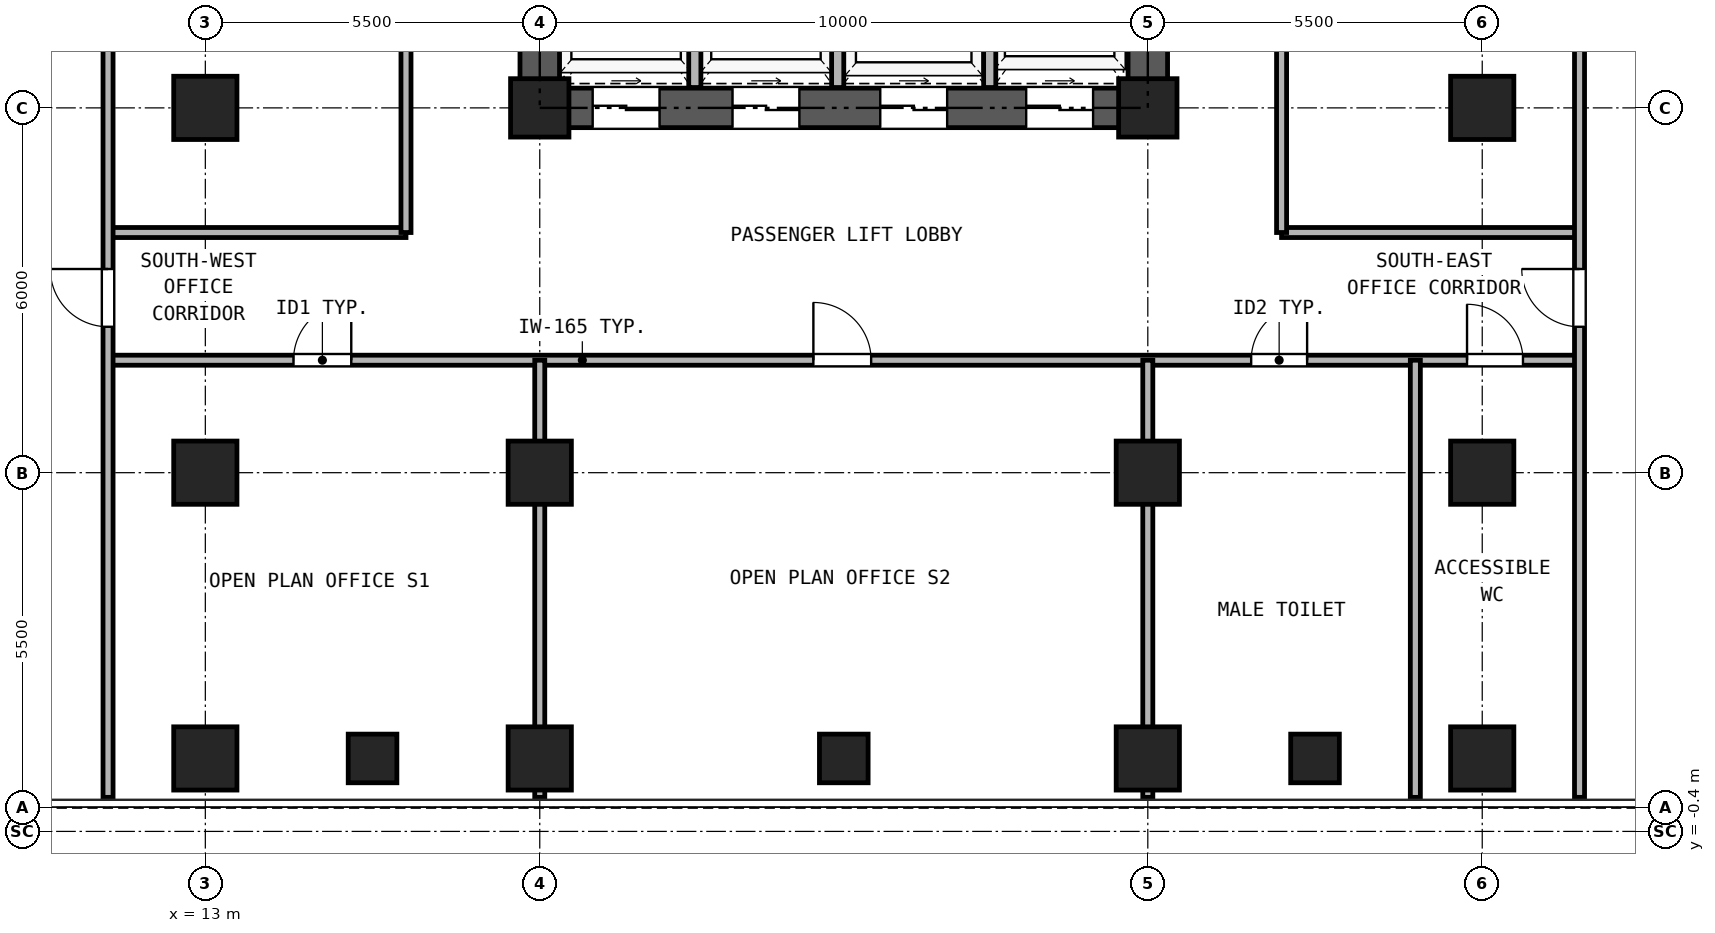
"""IFC4 building model, lengths in metres.
Left out: names, types, materials, properties, quantities, classifications, styles, units other than length and angle.
Written with IfcOpenShell. Run it as: python <this file> out.ifc"""

import sys

from ifc_helpers import new_model, si_unit, direction, frame, frame_2d, origin, origin_2d, place, context, subcontext, project, spatial, rectangle, hollow_rectangle, extrude, source, transform, mapped, element, fill, save


model = new_model("IFC4")
c1 = context("Model", 3, precision=1e-05, world=origin(), true_north=direction((0.0, 1.0)))
c2 = subcontext(c1, "Body", "Model", "MODEL_VIEW")
j1 = project(units=[si_unit("LENGTHUNIT", "METRE"), si_unit("PLANEANGLEUNIT", "RADIAN")], contexts=[c1])
p1 = place(None, origin())
s1 = spatial("IfcSite", under=j1, at=p1, CompositionType="ELEMENT")
p2 = place(p1, origin())
s2 = spatial("IfcBuilding", under=s1, at=p2, CompositionType="ELEMENT")
p3 = place(p2, frame((0.0, 0.0, 33.3)))
s3 = spatial("IfcBuildingStorey", under=s2, at=p3, CompositionType="ELEMENT", Elevation=33.3)
m1 = source(origin(), c2, "Body", "SweptSolid", [
    extrude(hollow_rectangle(XDim=1.04, YDim=1.04, WallThickness=0.065, at=origin_2d()), origin(), (0.0, 0.0, 1.0), 3.32),
])
for number, where, z_axis, x_axis in (
    (1, (13.0, 0.8, 0.0), (0.0, 0.0, 1.0), (1.0, 0.0, 0.0)),
    (2, (18.5, 0.8, 0.0), (0.0, 0.0, 1.0), (1.0, 0.0, 0.0)),
    (3, (28.5, 0.8, 0.0), (0.0, 0.0, 1.0), (1.0, 0.0, 0.0)),
    (4, (34.0, 0.8, 0.0), (0.0, 0.0, 1.0), (1.0, 0.0, 0.0)),
    (5, (13.0, 5.5, 0.0), (0.0, 0.0, 1.0), (1.0, 0.0, 0.0)),
    (6, (13.0, 11.5, 0.0), (0.0, 0.0, 1.0), (1.0, 0.0, 0.0)),
    (7, (18.5, 5.5, 0.0), (0.0, 0.0, 1.0), (1.0, 0.0, 0.0)),
):
    element("IfcColumn", number, at=place(p3, frame(where, z_axis=z_axis, x_axis=x_axis)), inside=s3, PredefinedType="COLUMN", context=c2, shape_type="MappedRepresentation", body=[
        mapped(m1, transform((0.0, 0.0, 0.0), x_axis=(1.0, 0.0, 0.0), y_axis=(0.0, 1.0, 0.0), z_axis=(0.0, 0.0, 1.0), scale=1.0)),
    ])
m2 = source(origin(), c2, "Body", "SweptSolid", [
    extrude(hollow_rectangle(XDim=0.96, YDim=0.96, WallThickness=0.06, at=origin_2d()), origin(), (0.0, 0.0, 1.0), 3.32),
])
p4 = place(p3, frame((18.5, 11.5, 0.0), z_axis=(0.0, 0.0, 1.0), x_axis=(1.0, 0.0, 0.0)))
e8 = element("IfcColumn", 8, at=p4, inside=s3, PredefinedType="COLUMN", context=c2, shape_type="MappedRepresentation", body=[
    mapped(m2, transform((0.0, 0.0, 0.0), x_axis=(1.0, 0.0, 0.0), y_axis=(0.0, 1.0, 0.0), z_axis=(0.0, 0.0, 1.0), scale=1.0)),
])
p5 = place(p3, frame((28.5, 5.5, 0.0), z_axis=(0.0, 0.0, 1.0), x_axis=(1.0, 0.0, 0.0)))
e9 = element("IfcColumn", 9, at=p5, inside=s3, PredefinedType="COLUMN", context=c2, shape_type="MappedRepresentation", body=[
    mapped(m1, transform((0.0, 0.0, 0.0), x_axis=(1.0, 0.0, 0.0), y_axis=(0.0, 1.0, 0.0), z_axis=(0.0, 0.0, 1.0), scale=1.0)),
])
p6 = place(p3, frame((28.5, 11.5, 0.0), z_axis=(0.0, 0.0, 1.0), x_axis=(1.0, 0.0, 0.0)))
e10 = element("IfcColumn", 10, at=p6, inside=s3, PredefinedType="COLUMN", context=c2, shape_type="MappedRepresentation", body=[
    mapped(m2, transform((0.0, 0.0, 0.0), x_axis=(1.0, 0.0, 0.0), y_axis=(0.0, 1.0, 0.0), z_axis=(0.0, 0.0, 1.0), scale=1.0)),
])
for number, where, z_axis, x_axis in (
    (11, (34.0, 5.5, 0.0), (0.0, 0.0, 1.0), (1.0, 0.0, 0.0)),
    (12, (34.0, 11.5, 0.0), (0.0, 0.0, 1.0), (1.0, 0.0, 0.0)),
):
    element("IfcColumn", number, at=place(p3, frame(where, z_axis=z_axis, x_axis=x_axis)), inside=s3, PredefinedType="COLUMN", context=c2, shape_type="MappedRepresentation", body=[
        mapped(m1, transform((0.0, 0.0, 0.0), x_axis=(1.0, 0.0, 0.0), y_axis=(0.0, 1.0, 0.0), z_axis=(0.0, 0.0, 1.0), scale=1.0)),
    ])
m3 = source(origin(), c2, "Body", "SweptSolid", [
    extrude(hollow_rectangle(XDim=0.8, YDim=0.8, WallThickness=0.045, at=origin_2d()), origin(), (0.0, 0.0, 1.0), 3.32),
])
for number, where, z_axis, x_axis in (
    (13, (15.75, 0.8, 0.0), (0.0, 0.0, 1.0), (1.0, 0.0, 0.0)),
    (14, (23.5, 0.8, 0.0), (0.0, 0.0, 1.0), (1.0, 0.0, 0.0)),
    (15, (31.25, 0.8, 0.0), (0.0, 0.0, 1.0), (1.0, 0.0, 0.0)),
):
    element("IfcColumn", number, at=place(p3, frame(where, z_axis=z_axis, x_axis=x_axis)), inside=s3, PredefinedType="COLUMN", context=c2, shape_type="MappedRepresentation", body=[
        mapped(m3, transform((0.0, 0.0, 0.0), x_axis=(1.0, 0.0, 0.0), y_axis=(0.0, 1.0, 0.0), z_axis=(0.0, 0.0, 1.0), scale=1.0)),
    ])
p7 = place(p3, frame((18.175, 11.5, 0.0), z_axis=(0.0, 0.0, 1.0), x_axis=(1.0, 0.0, 0.0)))
e16 = element("IfcWall", 16, at=p7, inside=s3, PredefinedType="SHEAR", context=c2, shape_type="SweptSolid", body=[
    extrude(rectangle(XDim=10.65, YDim=0.65, at=frame_2d((5.325, 0.0))), origin(), (0.0, 0.0, 1.0), 3.32),
])
p8 = place(p7, frame((1.195, 0.0, 0.0)))
e17 = element("IfcOpeningElement", 17, at=p8, cuts=e16, PredefinedType="OPENING", context=c2, shape_type="SweptSolid", body=[
    extrude(rectangle(XDim=1.1, YDim=2.25, at=frame_2d((0.55, 1.125))), frame((0.0, 0.335, 0.0), z_axis=(0.0, -1.0, 0.0), x_axis=(1.0, 0.0, 0.0)), (0.0, 0.0, 1.0), 0.67),
])
p9 = place(p7, frame((3.495, 0.0, 0.0)))
e18 = element("IfcOpeningElement", 18, at=p9, cuts=e16, PredefinedType="OPENING", context=c2, shape_type="SweptSolid", body=[
    extrude(rectangle(XDim=1.1, YDim=2.25, at=frame_2d((0.55, 1.125))), frame((0.0, 0.335, 0.0), z_axis=(0.0, -1.0, 0.0), x_axis=(1.0, 0.0, 0.0)), (0.0, 0.0, 1.0), 0.67),
])
p10 = place(p7, frame((5.925, 0.0, 0.0)))
e19 = element("IfcOpeningElement", 19, at=p10, cuts=e16, PredefinedType="OPENING", context=c2, shape_type="SweptSolid", body=[
    extrude(rectangle(XDim=1.1, YDim=2.25, at=frame_2d((0.55, 1.125))), frame((0.0, 0.335, 0.0), z_axis=(0.0, -1.0, 0.0), x_axis=(1.0, 0.0, 0.0)), (0.0, 0.0, 1.0), 0.67),
])
p11 = place(p7, frame((8.325, 0.0, 0.0)))
e20 = element("IfcOpeningElement", 20, at=p11, cuts=e16, PredefinedType="OPENING", context=c2, shape_type="SweptSolid", body=[
    extrude(rectangle(XDim=1.1, YDim=2.25, at=frame_2d((0.55, 1.125))), frame((0.0, 0.335, 0.0), z_axis=(0.0, -1.0, 0.0), x_axis=(1.0, 0.0, 0.0)), (0.0, 0.0, 1.0), 0.67),
])
p12 = place(p3, frame((18.5, 11.825, 0.0), z_axis=(0.0, 0.0, 1.0), x_axis=(0.0, 1.0, 0.0)))
e21 = element("IfcWall", 21, at=p12, inside=s3, PredefinedType="SHEAR", context=c2, shape_type="SweptSolid", body=[
    extrude(rectangle(XDim=16.6, YDim=0.65, at=frame_2d((8.3, 0.0))), origin(), (0.0, 0.0, 1.0), 3.32),
])
p13 = place(p12, frame((7.325, 0.0, 0.0)))
e22 = element("IfcOpeningElement", 22, at=p13, cuts=e21, PredefinedType="OPENING", context=c2, shape_type="SweptSolid", body=[
    extrude(rectangle(XDim=1.15, YDim=2.2, at=frame_2d((0.575, 1.1))), frame((0.0, 0.335, 0.0), z_axis=(0.0, -1.0, 0.0), x_axis=(1.0, 0.0, 0.0)), (0.0, 0.0, 1.0), 0.67),
])
p14 = place(p3, frame((28.5, 11.825, 0.0), z_axis=(0.0, 0.0, 1.0), x_axis=(0.0, 1.0, 0.0)))
e23 = element("IfcWall", 23, at=p14, inside=s3, PredefinedType="SHEAR", context=c2, shape_type="SweptSolid", body=[
    extrude(rectangle(XDim=16.6, YDim=0.65, at=frame_2d((8.3, 0.0))), origin(), (0.0, 0.0, 1.0), 3.32),
])
p15 = place(p14, frame((7.325, 0.0, 0.0)))
e24 = element("IfcOpeningElement", 24, at=p15, cuts=e23, PredefinedType="OPENING", context=c2, shape_type="SweptSolid", body=[
    extrude(rectangle(XDim=1.15, YDim=2.2, at=frame_2d((0.575, 1.1))), frame((0.0, 0.335, 0.0), z_axis=(0.0, -1.0, 0.0), x_axis=(1.0, 0.0, 0.0)), (0.0, 0.0, 1.0), 0.67),
])
for number, where, z_axis, x_axis in (
    (25, (21.05, 11.835, 0.0), (0.0, 0.0, 1.0), (0.0, 1.0, 0.0)),
    (26, (23.4, 11.835, 0.0), (0.0, 0.0, 1.0), (0.0, 1.0, 0.0)),
    (27, (25.9, 11.835, 0.0), (0.0, 0.0, 1.0), (0.0, 1.0, 0.0)),
):
    element("IfcWall", number, at=place(p3, frame(where, z_axis=z_axis, x_axis=x_axis)), inside=s3, PredefinedType="PARTITIONING", context=c2, shape_type="SweptSolid", body=[
        extrude(rectangle(XDim=3.165, YDim=0.2, at=frame_2d((1.583, 0.0))), origin(), (0.0, 0.0, 1.0), 3.32),
    ])
p16 = place(p3, frame((11.4, 7.35, 0.0), z_axis=(0.0, 0.0, 1.0), x_axis=(1.0, 0.0, 0.0)))
e28 = element("IfcWall", 28, at=p16, inside=s3, PredefinedType="PARTITIONING", context=c2, shape_type="SweptSolid", body=[
    extrude(rectangle(XDim=24.2, YDim=0.165, at=frame_2d((12.1, 0.0))), origin(), (0.0, 0.0, 1.0), 3.32),
])
p17 = place(p16, frame((3.05, 0.0, 0.0)))
e29 = element("IfcOpeningElement", 29, at=p17, cuts=e28, PredefinedType="OPENING", context=c2, shape_type="SweptSolid", body=[
    extrude(rectangle(XDim=0.95, YDim=2.15, at=frame_2d((0.475, 1.075))), frame((0.0, 0.093, 0.0), z_axis=(0.0, -1.0, 0.0), x_axis=(1.0, 0.0, 0.0)), (0.0, 0.0, 1.0), 0.185),
])
p18 = place(p16, frame((11.6, 0.0, 0.0)))
e30 = element("IfcOpeningElement", 30, at=p18, cuts=e28, PredefinedType="OPENING", context=c2, shape_type="SweptSolid", body=[
    extrude(rectangle(XDim=0.95, YDim=2.15, at=frame_2d((0.475, 1.075))), frame((0.0, 0.093, 0.0), z_axis=(0.0, -1.0, 0.0), x_axis=(1.0, 0.0, 0.0)), (0.0, 0.0, 1.0), 0.185),
])
p19 = place(p16, frame((18.8, 0.0, 0.0)))
e31 = element("IfcOpeningElement", 31, at=p19, cuts=e28, PredefinedType="OPENING", context=c2, shape_type="SweptSolid", body=[
    extrude(rectangle(XDim=0.92, YDim=2.1, at=frame_2d((0.46, 1.05))), frame((0.0, 0.093, 0.0), z_axis=(0.0, -1.0, 0.0), x_axis=(1.0, 0.0, 0.0)), (0.0, 0.0, 1.0), 0.185),
])
p20 = place(p16, frame((22.35, 0.0, 0.0)))
e32 = element("IfcOpeningElement", 32, at=p20, cuts=e28, PredefinedType="OPENING", context=c2, shape_type="SweptSolid", body=[
    extrude(rectangle(XDim=0.92, YDim=2.1, at=frame_2d((0.46, 1.05))), frame((0.0, 0.093, 0.0), z_axis=(0.0, -1.0, 0.0), x_axis=(1.0, 0.0, 0.0)), (0.0, 0.0, 1.0), 0.185),
])
for number, where, z_axis, x_axis in (
    (33, (11.4, 9.45, 0.0), (0.0, 0.0, 1.0), (1.0, 0.0, 0.0)),
    (34, (30.7, 9.45, 0.0), (0.0, 0.0, 1.0), (1.0, 0.0, 0.0)),
):
    element("IfcWall", number, at=place(p3, frame(where, z_axis=z_axis, x_axis=x_axis)), inside=s3, PredefinedType="PARTITIONING", context=c2, shape_type="SweptSolid", body=[
        extrude(rectangle(XDim=4.9, YDim=0.165, at=frame_2d((2.45, 0.0))), origin(), (0.0, 0.0, 1.0), 3.32),
    ])
p21 = place(p3, frame((16.3, 9.45, 0.0), z_axis=(0.0, 0.0, 1.0), x_axis=(0.0, 1.0, 0.0)))
e35 = element("IfcWall", 35, at=p21, inside=s3, PredefinedType="PARTITIONING", context=c2, shape_type="SweptSolid", body=[
    extrude(rectangle(XDim=20.8, YDim=0.165, at=frame_2d((10.4, 0.0))), origin(), (0.0, 0.0, 1.0), 3.32),
])
p22 = place(p21, frame((6.2, 0.0, 0.0)))
e36 = element("IfcOpeningElement", 36, at=p22, cuts=e35, PredefinedType="OPENING", context=c2, shape_type="SweptSolid", body=[
    extrude(rectangle(XDim=0.95, YDim=2.15, at=frame_2d((0.475, 1.075))), frame((0.0, 0.093, 0.0), z_axis=(0.0, -1.0, 0.0), x_axis=(1.0, 0.0, 0.0)), (0.0, 0.0, 1.0), 0.185),
])
p23 = place(p21, frame((16.6, 0.0, 0.0)))
e37 = element("IfcOpeningElement", 37, at=p23, cuts=e35, PredefinedType="OPENING", context=c2, shape_type="SweptSolid", body=[
    extrude(rectangle(XDim=0.95, YDim=2.15, at=frame_2d((0.475, 1.075))), frame((0.0, 0.093, 0.0), z_axis=(0.0, -1.0, 0.0), x_axis=(1.0, 0.0, 0.0)), (0.0, 0.0, 1.0), 0.185),
])
p24 = place(p3, frame((30.7, 9.45, 0.0), z_axis=(0.0, 0.0, 1.0), x_axis=(0.0, 1.0, 0.0)))
e38 = element("IfcWall", 38, at=p24, inside=s3, PredefinedType="PARTITIONING", context=c2, shape_type="SweptSolid", body=[
    extrude(rectangle(XDim=20.8, YDim=0.165, at=frame_2d((10.4, 0.0))), origin(), (0.0, 0.0, 1.0), 3.32),
])
p25 = place(p24, frame((9.9, 0.0, 0.0)))
e39 = element("IfcOpeningElement", 39, at=p25, cuts=e38, PredefinedType="OPENING", context=c2, shape_type="SweptSolid", body=[
    extrude(rectangle(XDim=0.95, YDim=2.15, at=frame_2d((0.475, 1.075))), frame((0.0, 0.093, 0.0), z_axis=(0.0, -1.0, 0.0), x_axis=(1.0, 0.0, 0.0)), (0.0, 0.0, 1.0), 0.185),
])
p26 = place(p3, frame((11.4, 0.16, 0.0), z_axis=(0.0, 0.0, 1.0), x_axis=(0.0, 1.0, 0.0)))
e40 = element("IfcWall", 40, at=p26, inside=s3, PredefinedType="PARTITIONING", context=c2, shape_type="SweptSolid", body=[
    extrude(rectangle(XDim=40.18, YDim=0.165, at=frame_2d((20.09, 0.0))), origin(), (0.0, 0.0, 1.0), 3.32),
])
p27 = place(p26, frame((7.74, 0.0, 0.0)))
e41 = element("IfcOpeningElement", 41, at=p27, cuts=e40, PredefinedType="OPENING", context=c2, shape_type="SweptSolid", body=[
    extrude(rectangle(XDim=0.95, YDim=2.15, at=frame_2d((0.475, 1.075))), frame((0.0, 0.093, 0.0), z_axis=(0.0, -1.0, 0.0), x_axis=(1.0, 0.0, 0.0)), (0.0, 0.0, 1.0), 0.185),
])
p28 = place(p26, frame((30.64, 0.0, 0.0)))
e42 = element("IfcOpeningElement", 42, at=p28, cuts=e40, PredefinedType="OPENING", context=c2, shape_type="SweptSolid", body=[
    extrude(rectangle(XDim=0.95, YDim=2.15, at=frame_2d((0.475, 1.075))), frame((0.0, 0.093, 0.0), z_axis=(0.0, -1.0, 0.0), x_axis=(1.0, 0.0, 0.0)), (0.0, 0.0, 1.0), 0.185),
])
p29 = place(p3, frame((35.6, 0.16, 0.0), z_axis=(0.0, 0.0, 1.0), x_axis=(0.0, 1.0, 0.0)))
e43 = element("IfcWall", 43, at=p29, inside=s3, PredefinedType="PARTITIONING", context=c2, shape_type="SweptSolid", body=[
    extrude(rectangle(XDim=40.18, YDim=0.165, at=frame_2d((20.09, 0.0))), origin(), (0.0, 0.0, 1.0), 3.32),
])
p30 = place(p29, frame((7.74, 0.0, 0.0)))
e44 = element("IfcOpeningElement", 44, at=p30, cuts=e43, PredefinedType="OPENING", context=c2, shape_type="SweptSolid", body=[
    extrude(rectangle(XDim=0.95, YDim=2.15, at=frame_2d((0.475, 1.075))), frame((0.0, 0.093, 0.0), z_axis=(0.0, -1.0, 0.0), x_axis=(1.0, 0.0, 0.0)), (0.0, 0.0, 1.0), 0.185),
])
p31 = place(p29, frame((30.64, 0.0, 0.0)))
e45 = element("IfcOpeningElement", 45, at=p31, cuts=e43, PredefinedType="OPENING", context=c2, shape_type="SweptSolid", body=[
    extrude(rectangle(XDim=0.95, YDim=2.15, at=frame_2d((0.475, 1.075))), frame((0.0, 0.093, 0.0), z_axis=(0.0, -1.0, 0.0), x_axis=(1.0, 0.0, 0.0)), (0.0, 0.0, 1.0), 0.185),
])
for number, where, z_axis, x_axis in (
    (46, (18.5, 0.16, 0.0), (0.0, 0.0, 1.0), (0.0, 1.0, 0.0)),
    (47, (28.5, 0.16, 0.0), (0.0, 0.0, 1.0), (0.0, 1.0, 0.0)),
):
    element("IfcWall", number, at=place(p3, frame(where, z_axis=z_axis, x_axis=x_axis)), inside=s3, PredefinedType="PARTITIONING", context=c2, shape_type="SweptSolid", body=[
        extrude(rectangle(XDim=7.19, YDim=0.165, at=frame_2d((3.595, 0.0))), origin(), (0.0, 0.0, 1.0), 2.539),
    ])
p32 = place(p3, frame((32.9, 0.16, 0.0), z_axis=(0.0, 0.0, 1.0), x_axis=(0.0, 1.0, 0.0)))
e48 = element("IfcWall", 48, at=p32, inside=s3, PredefinedType="PARTITIONING", context=c2, shape_type="SweptSolid", body=[
    extrude(rectangle(XDim=7.19, YDim=0.165, at=frame_2d((3.595, 0.0))), origin(), (0.0, 0.0, 1.0), 3.32),
])
p33 = place(p8, frame((1.1, 0.0, 0.0), z_axis=(0.0, 0.0, 1.0), x_axis=(-1.0, 0.0, 0.0)))
e49 = element("IfcDoor", 49, at=p33, inside=s3, OperationType="DOUBLE_DOOR_SLIDING", PredefinedType="DOOR", context=c2, shape_type="SweptSolid", body=[
    extrude(rectangle(XDim=1.1, YDim=2.25, at=frame_2d((0.55, 1.125))), frame((0.0, 0.025, 0.0), z_axis=(0.0, -1.0, 0.0), x_axis=(1.0, 0.0, 0.0)), (0.0, 0.0, 1.0), 0.05),
])
fill(e17, e49)
p34 = place(p9, frame((1.1, 0.0, 0.0), z_axis=(0.0, 0.0, 1.0), x_axis=(-1.0, 0.0, 0.0)))
e50 = element("IfcDoor", 50, at=p34, inside=s3, OperationType="DOUBLE_DOOR_SLIDING", PredefinedType="DOOR", context=c2, shape_type="SweptSolid", body=[
    extrude(rectangle(XDim=1.1, YDim=2.25, at=frame_2d((0.55, 1.125))), frame((0.0, 0.025, 0.0), z_axis=(0.0, -1.0, 0.0), x_axis=(1.0, 0.0, 0.0)), (0.0, 0.0, 1.0), 0.05),
])
fill(e18, e50)
p35 = place(p10, frame((1.1, 0.0, 0.0), z_axis=(0.0, 0.0, 1.0), x_axis=(-1.0, 0.0, 0.0)))
e51 = element("IfcDoor", 51, at=p35, inside=s3, OperationType="DOUBLE_DOOR_SLIDING", PredefinedType="DOOR", context=c2, shape_type="SweptSolid", body=[
    extrude(rectangle(XDim=1.1, YDim=2.25, at=frame_2d((0.55, 1.125))), frame((0.0, 0.025, 0.0), z_axis=(0.0, -1.0, 0.0), x_axis=(1.0, 0.0, 0.0)), (0.0, 0.0, 1.0), 0.05),
])
fill(e19, e51)
p36 = place(p11, frame((1.1, 0.0, 0.0), z_axis=(0.0, 0.0, 1.0), x_axis=(-1.0, 0.0, 0.0)))
e52 = element("IfcDoor", 52, at=p36, inside=s3, OperationType="DOUBLE_DOOR_SLIDING", PredefinedType="DOOR", context=c2, shape_type="SweptSolid", body=[
    extrude(rectangle(XDim=1.1, YDim=2.25, at=frame_2d((0.55, 1.125))), frame((0.0, 0.025, 0.0), z_axis=(0.0, -1.0, 0.0), x_axis=(1.0, 0.0, 0.0)), (0.0, 0.0, 1.0), 0.05),
])
fill(e20, e52)
p37 = place(p17, frame((0.95, 0.0, 0.0), z_axis=(0.0, 0.0, 1.0), x_axis=(-1.0, 0.0, 0.0)))
e53 = element("IfcDoor", 53, at=p37, inside=s3, OperationType="SINGLE_SWING_RIGHT", PredefinedType="DOOR", context=c2, shape_type="SweptSolid", body=[
    extrude(rectangle(XDim=0.95, YDim=2.15, at=frame_2d((0.475, 1.075))), frame((0.0, 0.025, 0.0), z_axis=(0.0, -1.0, 0.0), x_axis=(1.0, 0.0, 0.0)), (0.0, 0.0, 1.0), 0.05),
])
fill(e29, e53)
p38 = place(p18, frame((0.95, 0.0, 0.0), z_axis=(0.0, 0.0, 1.0), x_axis=(-1.0, 0.0, 0.0)))
e54 = element("IfcDoor", 54, at=p38, inside=s3, OperationType="SINGLE_SWING_LEFT", PredefinedType="DOOR", context=c2, shape_type="SweptSolid", body=[
    extrude(rectangle(XDim=0.95, YDim=2.15, at=frame_2d((0.475, 1.075))), frame((0.0, 0.025, 0.0), z_axis=(0.0, -1.0, 0.0), x_axis=(1.0, 0.0, 0.0)), (0.0, 0.0, 1.0), 0.05),
])
fill(e30, e54)
p39 = place(p19, frame((0.92, 0.0, 0.0), z_axis=(0.0, 0.0, 1.0), x_axis=(-1.0, 0.0, 0.0)))
e55 = element("IfcDoor", 55, at=p39, inside=s3, OperationType="SINGLE_SWING_RIGHT", PredefinedType="DOOR", context=c2, shape_type="SweptSolid", body=[
    extrude(rectangle(XDim=0.92, YDim=2.1, at=frame_2d((0.46, 1.05))), frame((0.0, 0.025, 0.0), z_axis=(0.0, -1.0, 0.0), x_axis=(1.0, 0.0, 0.0)), (0.0, 0.0, 1.0), 0.05),
])
fill(e31, e55)
p40 = place(p20, frame((0.92, 0.0, 0.0), z_axis=(0.0, 0.0, 1.0), x_axis=(-1.0, 0.0, 0.0)))
e56 = element("IfcDoor", 56, at=p40, inside=s3, OperationType="SINGLE_SWING_LEFT", PredefinedType="DOOR", context=c2, shape_type="SweptSolid", body=[
    extrude(rectangle(XDim=0.92, YDim=2.1, at=frame_2d((0.46, 1.05))), frame((0.0, 0.025, 0.0), z_axis=(0.0, -1.0, 0.0), x_axis=(1.0, 0.0, 0.0)), (0.0, 0.0, 1.0), 0.05),
])
fill(e32, e56)
p41 = place(p27, frame((0.95, 0.0, 0.0), z_axis=(0.0, 0.0, 1.0), x_axis=(-1.0, 0.0, 0.0)))
e57 = element("IfcDoor", 57, at=p41, inside=s3, OperationType="SINGLE_SWING_RIGHT", PredefinedType="DOOR", context=c2, shape_type="SweptSolid", body=[
    extrude(rectangle(XDim=0.95, YDim=2.15, at=frame_2d((0.475, 1.075))), frame((0.0, 0.025, 0.0), z_axis=(0.0, -1.0, 0.0), x_axis=(1.0, 0.0, 0.0)), (0.0, 0.0, 1.0), 0.05),
])
fill(e41, e57)
p42 = place(p30, origin())
e58 = element("IfcDoor", 58, at=p42, inside=s3, OperationType="SINGLE_SWING_RIGHT", PredefinedType="DOOR", context=c2, shape_type="SweptSolid", body=[
    extrude(rectangle(XDim=0.95, YDim=2.15, at=frame_2d((0.475, 1.075))), frame((0.0, 0.025, 0.0), z_axis=(0.0, -1.0, 0.0), x_axis=(1.0, 0.0, 0.0)), (0.0, 0.0, 1.0), 0.05),
])
fill(e44, e58)
save(model, sys.argv[1])
